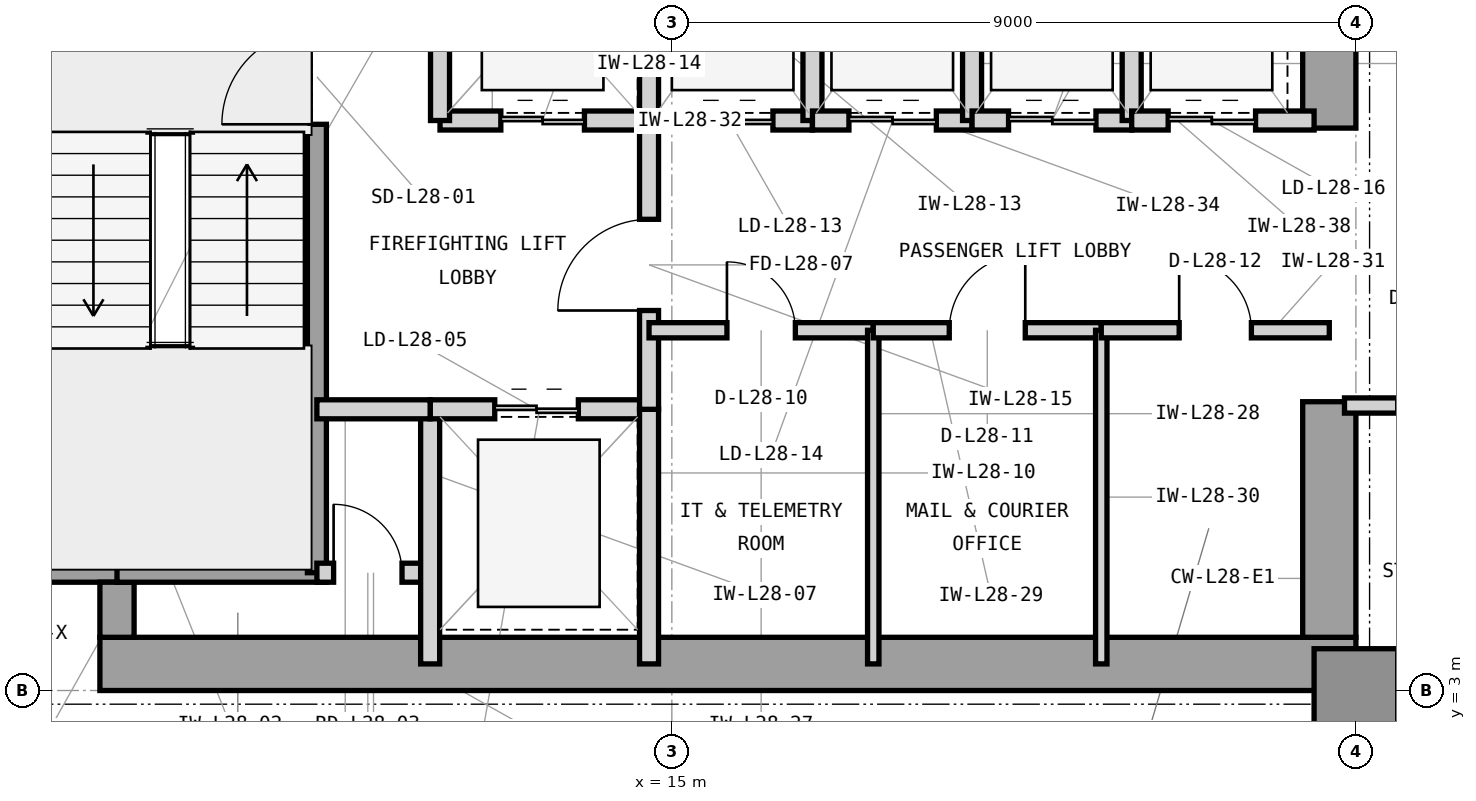
"""IFC4 building model, lengths in metres.
Left out: names, types, materials, properties, quantities, classifications, styles, units other than length and angle.
Written with IfcOpenShell. Run it as: python <this file> out.ifc"""

import sys

from ifc_helpers import new_model, si_unit, direction, frame, frame_2d, origin, origin_2d, place, context, subcontext, project, spatial, rectangle, extrude, element, fill, save


model = new_model("IFC4")
c1 = context("Model", 3, precision=1e-05, world=origin(), true_north=direction((0.0, 1.0)))
c2 = subcontext(c1, "Body", "Model", "MODEL_VIEW")
j1 = project(units=[si_unit("LENGTHUNIT", "METRE"), si_unit("PLANEANGLEUNIT", "RADIAN")], contexts=[c1])
p1 = place(None, origin())
s1 = spatial("IfcSite", under=j1, at=p1, CompositionType="ELEMENT")
p2 = place(p1, origin())
s2 = spatial("IfcBuilding", under=s1, at=p2, CompositionType="ELEMENT")
p3 = place(p2, frame((0.0, 0.0, 120.6)))
s3 = spatial("IfcBuildingStorey", under=s2, at=p3, CompositionType="ELEMENT", Elevation=120.6)
p4 = place(p3, frame((7.475, 3.35, 0.0), z_axis=(0.0, 0.0, 1.0), x_axis=(1.0, 0.0, 0.0)))
e1 = element("IfcWall", 1, at=p4, inside=s3, PredefinedType="SHEAR", context=c2, shape_type="SweptSolid", body=[
    extrude(rectangle(XDim=16.525, YDim=0.7, at=frame_2d((8.262, 0.0))), origin(), (0.0, 0.0, 1.0), 3.9),
])
p5 = place(p3, frame((23.65, 3.7, 0.0), z_axis=(0.0, 0.0, 1.0), x_axis=(0.0, 1.0, 0.0)))
e2 = element("IfcWall", 2, at=p5, inside=s3, PredefinedType="SHEAR", context=c2, shape_type="SweptSolid", body=[
    extrude(rectangle(XDim=3.1, YDim=0.7, at=frame_2d((1.55, 0.0))), origin(), (0.0, 0.0, 1.0), 3.9),
])
p6 = place(p3, frame((23.65, 10.4, 0.0), z_axis=(0.0, 0.0, 1.0), x_axis=(0.0, 1.0, 0.0)))
e3 = element("IfcWall", 3, at=p6, inside=s3, PredefinedType="SHEAR", context=c2, shape_type="SweptSolid", body=[
    extrude(rectangle(XDim=3.2, YDim=0.7, at=frame_2d((1.6, 0.0))), origin(), (0.0, 0.0, 1.0), 3.9),
])
p7 = place(p3, frame((6.7, 4.65, 0.0), z_axis=(0.0, 0.0, 1.0), x_axis=(1.0, 0.0, 0.0)))
e4 = element("IfcWall", 4, at=p7, inside=s3, PredefinedType="SHEAR", context=c2, shape_type="SweptSolid", body=[
    extrude(rectangle(XDim=1.225, YDim=0.45, at=frame_2d((0.613, 0.0))), origin(), (0.0, 0.0, 1.0), 3.9),
])
p8 = place(p3, frame((7.7, 3.7, 0.0), z_axis=(0.0, 0.0, 1.0), x_axis=(0.0, 1.0, 0.0)))
e5 = element("IfcWall", 5, at=p8, inside=s3, PredefinedType="SHEAR", context=c2, shape_type="SweptSolid", body=[
    extrude(rectangle(XDim=0.725, YDim=0.45, at=frame_2d((0.363, 0.0))), origin(), (0.0, 0.0, 1.0), 3.9),
])
p9 = place(p3, frame((24.0, 3.0, 0.0), z_axis=(0.0, 0.0, 1.0), x_axis=(1.0, 0.0, 0.0)))
e6 = element("IfcColumn", 6, at=p9, inside=s3, PredefinedType="COLUMN", context=c2, shape_type="SweptSolid", body=[
    extrude(rectangle(XDim=1.1, YDim=1.1, at=origin_2d()), origin(), (0.0, 0.0, 1.0), 3.9),
])
p10 = place(p3, frame((23.9, 3.19, 0.0), z_axis=(0.0, 0.0, 1.0), x_axis=(1.0, 0.0, 0.0)))
e7 = element("IfcWall", 7, at=p10, inside=s3, PredefinedType="STANDARD", context=c2, shape_type="SweptSolid", body=[
    extrude(rectangle(XDim=18.1, YDim=0.38, at=frame_2d((9.05, 0.0))), origin(), (0.0, 0.0, 1.0), 3.7),
])
p11 = place(p10, frame((5.538, 0.0, 0.85)))
e8 = element("IfcOpeningElement", 8, at=p11, cuts=e7, PredefinedType="OPENING", context=c2, shape_type="SweptSolid", body=[
    extrude(rectangle(XDim=2.5, YDim=2.25, at=frame_2d((1.25, 1.125))), frame((0.0, 0.2, 0.0), z_axis=(0.0, -1.0, 0.0), x_axis=(1.0, 0.0, 0.0)), (0.0, 0.0, 1.0), 0.4),
])
p12 = place(p10, frame((14.938, 0.0, 0.85)))
e9 = element("IfcOpeningElement", 9, at=p12, cuts=e7, PredefinedType="OPENING", context=c2, shape_type="SweptSolid", body=[
    extrude(rectangle(XDim=1.8, YDim=2.25, at=frame_2d((0.9, 1.125))), frame((0.0, 0.2, 0.0), z_axis=(0.0, -1.0, 0.0), x_axis=(1.0, 0.0, 0.0)), (0.0, 0.0, 1.0), 0.4),
])
p13 = place(p10, frame((1.1, 0.0, 0.85)))
e10 = element("IfcOpeningElement", 10, at=p13, cuts=e7, PredefinedType="OPENING", context=c2, shape_type="SweptSolid", body=[
    extrude(rectangle(XDim=1.2, YDim=2.25, at=frame_2d((0.6, 1.125))), frame((0.0, 0.2, 0.0), z_axis=(0.0, -1.0, 0.0), x_axis=(1.0, 0.0, 0.0)), (0.0, 0.0, 1.0), 0.4),
])
p14 = place(p3, frame((7.7, 4.55, 0.0), z_axis=(0.0, 0.0, 1.0), x_axis=(1.0, 0.0, 0.0)))
e11 = element("IfcWall", 11, at=p14, inside=s3, PredefinedType="SHEAR", context=c2, shape_type="SweptSolid", body=[
    extrude(rectangle(XDim=2.755, YDim=0.25, at=frame_2d((1.377, 0.0))), origin(), (0.0, 0.0, 1.0), 3.9),
])
p15 = place(p3, frame((10.33, 4.55, 0.0), z_axis=(0.0, 0.0, 1.0), x_axis=(0.0, 1.0, 0.0)))
e12 = element("IfcWall", 12, at=p15, inside=s3, PredefinedType="SHEAR", context=c2, shape_type="SweptSolid", body=[
    extrude(rectangle(XDim=7.45, YDim=0.25, at=frame_2d((3.725, 0.0))), origin(), (0.0, 0.0, 1.0), 3.9),
])
p16 = place(p15, frame((5.9, 0.0, 0.0)))
e13 = element("IfcOpeningElement", 13, at=p16, cuts=e12, PredefinedType="OPENING", context=c2, shape_type="SweptSolid", body=[
    extrude(rectangle(XDim=1.25, YDim=2.2, at=frame_2d((0.625, 1.1))), frame((0.0, 0.135, 0.0), z_axis=(0.0, -1.0, 0.0), x_axis=(1.0, 0.0, 0.0)), (0.0, 0.0, 1.0), 0.27),
])
p17 = place(p3, frame((10.33, 4.55, 0.0), z_axis=(0.0, 0.0, 1.0), x_axis=(1.0, 0.0, 0.0)))
e14 = element("IfcWall", 14, at=p17, inside=s3, PredefinedType="PARTITIONING", context=c2, shape_type="SweptSolid", body=[
    extrude(rectangle(XDim=1.49, YDim=0.25, at=frame_2d((0.745, 0.0))), origin(), (0.0, 0.0, 1.0), 3.69),
])
p18 = place(p17, frame((0.22, 0.0, 0.0)))
e15 = element("IfcOpeningElement", 15, at=p18, cuts=e14, PredefinedType="OPENING", context=c2, shape_type="SweptSolid", body=[
    extrude(rectangle(XDim=0.9, YDim=2.1, at=frame_2d((0.45, 1.05))), frame((0.0, 0.135, 0.0), z_axis=(0.0, -1.0, 0.0), x_axis=(1.0, 0.0, 0.0)), (0.0, 0.0, 1.0), 0.27),
])
p19 = place(p3, frame((11.82, 3.35, 0.0), z_axis=(0.0, 0.0, 1.0), x_axis=(0.0, 1.0, 0.0)))
e16 = element("IfcWall", 16, at=p19, inside=s3, PredefinedType="PARTITIONING", context=c2, shape_type="SweptSolid", body=[
    extrude(rectangle(XDim=3.35, YDim=0.25, at=frame_2d((1.675, 0.0))), origin(), (0.0, 0.0, 1.0), 3.69),
])
p20 = place(p3, frame((11.82, 6.7, 0.0), z_axis=(0.0, 0.0, 1.0), x_axis=(1.0, 0.0, 0.0)))
e17 = element("IfcWall", 17, at=p20, inside=s3, PredefinedType="PARTITIONING", context=c2, shape_type="SweptSolid", body=[
    extrude(rectangle(XDim=2.88, YDim=0.25, at=frame_2d((1.44, 0.0))), origin(), (0.0, 0.0, 1.0), 3.227),
])
p21 = place(p20, frame((0.85, 0.0, 0.0)))
e18 = element("IfcOpeningElement", 18, at=p21, cuts=e17, PredefinedType="OPENING", context=c2, shape_type="SweptSolid", body=[
    extrude(rectangle(XDim=1.1, YDim=2.25, at=frame_2d((0.55, 1.125))), frame((0.0, 0.135, 0.0), z_axis=(0.0, -1.0, 0.0), x_axis=(1.0, 0.0, 0.0)), (0.0, 0.0, 1.0), 0.27),
])
p22 = place(p3, frame((14.7, 3.35, 0.0), z_axis=(0.0, 0.0, 1.0), x_axis=(0.0, 1.0, 0.0)))
e19 = element("IfcWall", 19, at=p22, inside=s3, PredefinedType="PARTITIONING", context=c2, shape_type="SweptSolid", body=[
    extrude(rectangle(XDim=3.35, YDim=0.25, at=frame_2d((1.675, 0.0))), origin(), (0.0, 0.0, 1.0), 3.69),
])
p23 = place(p3, frame((11.95, 10.5, 0.0), z_axis=(0.0, 0.0, 1.0), x_axis=(1.0, 0.0, 0.0)))
e20 = element("IfcWall", 20, at=p23, inside=s3, PredefinedType="PARTITIONING", context=c2, shape_type="SweptSolid", body=[
    extrude(rectangle(XDim=2.75, YDim=0.25, at=frame_2d((1.375, 0.0))), origin(), (0.0, 0.0, 1.0), 3.227),
])
p24 = place(p23, frame((0.8, 0.0, 0.0)))
e21 = element("IfcOpeningElement", 21, at=p24, cuts=e20, PredefinedType="OPENING", context=c2, shape_type="SweptSolid", body=[
    extrude(rectangle(XDim=1.1, YDim=2.25, at=frame_2d((0.55, 1.125))), frame((0.0, 0.135, 0.0), z_axis=(0.0, -1.0, 0.0), x_axis=(1.0, 0.0, 0.0)), (0.0, 0.0, 1.0), 0.27),
])
for number, where, z_axis, x_axis in (
    (22, (11.95, 10.5, 0.0), (0.0, 0.0, 1.0), (0.0, 1.0, 0.0)),
    (23, (14.7, 10.5, 0.0), (0.0, 0.0, 1.0), (0.0, 1.0, 0.0)),
):
    element("IfcWall", number, at=place(p3, frame(where, z_axis=z_axis, x_axis=x_axis)), inside=s3, PredefinedType="PARTITIONING", context=c2, shape_type="SweptSolid", body=[
        extrude(rectangle(XDim=3.0, YDim=0.25, at=frame_2d((1.5, 0.0))), origin(), (0.0, 0.0, 1.0), 3.69),
    ])
p25 = place(p3, frame((14.7, 6.7, 0.0), z_axis=(0.0, 0.0, 1.0), x_axis=(0.0, 1.0, 0.0)))
e24 = element("IfcWall", 24, at=p25, inside=s3, PredefinedType="PARTITIONING", context=c2, shape_type="SweptSolid", body=[
    extrude(rectangle(XDim=3.8, YDim=0.25, at=frame_2d((1.9, 0.0))), origin(), (0.0, 0.0, 1.0), 3.69),
])
p26 = place(p25, frame((1.3, 0.0, 0.0)))
e25 = element("IfcOpeningElement", 25, at=p26, cuts=e24, PredefinedType="OPENING", context=c2, shape_type="SweptSolid", body=[
    extrude(rectangle(XDim=1.2, YDim=2.2, at=frame_2d((0.6, 1.1))), frame((0.0, 0.135, 0.0), z_axis=(0.0, -1.0, 0.0), x_axis=(1.0, 0.0, 0.0)), (0.0, 0.0, 1.0), 0.27),
])
p27 = place(p3, frame((10.33, 6.7, 0.0), z_axis=(0.0, 0.0, 1.0), x_axis=(1.0, 0.0, 0.0)))
e26 = element("IfcWall", 26, at=p27, inside=s3, PredefinedType="PARTITIONING", context=c2, shape_type="SweptSolid", body=[
    extrude(rectangle(XDim=1.49, YDim=0.25, at=frame_2d((0.745, 0.0))), origin(), (0.0, 0.0, 1.0), 3.227),
])
p28 = place(p3, frame((14.7, 7.74, 0.0), z_axis=(0.0, 0.0, 1.0), x_axis=(1.0, 0.0, 0.0)))
e27 = element("IfcWall", 27, at=p28, inside=s3, PredefinedType="PARTITIONING", context=c2, shape_type="SweptSolid", body=[
    extrude(rectangle(XDim=2.95, YDim=0.2, at=frame_2d((1.475, 0.0))), origin(), (0.0, 0.0, 1.0), 3.69),
])
p29 = place(p28, frame((1.025, 0.0, 0.0)))
e28 = element("IfcOpeningElement", 28, at=p29, cuts=e27, PredefinedType="OPENING", context=c2, shape_type="SweptSolid", body=[
    extrude(rectangle(XDim=0.9, YDim=2.1, at=frame_2d((0.45, 1.05))), frame((0.0, 0.11, 0.0), z_axis=(0.0, -1.0, 0.0), x_axis=(1.0, 0.0, 0.0)), (0.0, 0.0, 1.0), 0.22),
])
p30 = place(p3, frame((17.65, 3.35, 0.0), z_axis=(0.0, 0.0, 1.0), x_axis=(0.0, 1.0, 0.0)))
e29 = element("IfcWall", 29, at=p30, inside=s3, PredefinedType="PARTITIONING", context=c2, shape_type="SweptSolid", body=[
    extrude(rectangle(XDim=4.39, YDim=0.15, at=frame_2d((2.195, 0.0))), origin(), (0.0, 0.0, 1.0), 3.69),
])
p31 = place(p3, frame((17.65, 7.74, 0.0), z_axis=(0.0, 0.0, 1.0), x_axis=(1.0, 0.0, 0.0)))
e30 = element("IfcWall", 30, at=p31, inside=s3, PredefinedType="PARTITIONING", context=c2, shape_type="SweptSolid", body=[
    extrude(rectangle(XDim=3.0, YDim=0.2, at=frame_2d((1.5, 0.0))), origin(), (0.0, 0.0, 1.0), 3.69),
])
p32 = place(p31, frame((1.0, 0.0, 0.0)))
e31 = element("IfcOpeningElement", 31, at=p32, cuts=e30, PredefinedType="OPENING", context=c2, shape_type="SweptSolid", body=[
    extrude(rectangle(XDim=1.0, YDim=2.15, at=frame_2d((0.5, 1.075))), frame((0.0, 0.11, 0.0), z_axis=(0.0, -1.0, 0.0), x_axis=(1.0, 0.0, 0.0)), (0.0, 0.0, 1.0), 0.22),
])
p33 = place(p3, frame((20.65, 3.35, 0.0), z_axis=(0.0, 0.0, 1.0), x_axis=(0.0, 1.0, 0.0)))
e32 = element("IfcWall", 32, at=p33, inside=s3, PredefinedType="PARTITIONING", context=c2, shape_type="SweptSolid", body=[
    extrude(rectangle(XDim=4.39, YDim=0.15, at=frame_2d((2.195, 0.0))), origin(), (0.0, 0.0, 1.0), 3.69),
])
p34 = place(p3, frame((20.65, 7.74, 0.0), z_axis=(0.0, 0.0, 1.0), x_axis=(1.0, 0.0, 0.0)))
e33 = element("IfcWall", 33, at=p34, inside=s3, PredefinedType="PARTITIONING", context=c2, shape_type="SweptSolid", body=[
    extrude(rectangle(XDim=3.0, YDim=0.2, at=frame_2d((1.5, 0.0))), origin(), (0.0, 0.0, 1.0), 3.69),
])
p35 = place(p34, frame((1.025, 0.0, 0.0)))
e34 = element("IfcOpeningElement", 34, at=p35, cuts=e33, PredefinedType="OPENING", context=c2, shape_type="SweptSolid", body=[
    extrude(rectangle(XDim=0.95, YDim=2.1, at=frame_2d((0.475, 1.05))), frame((0.0, 0.11, 0.0), z_axis=(0.0, -1.0, 0.0), x_axis=(1.0, 0.0, 0.0)), (0.0, 0.0, 1.0), 0.22),
])
p36 = place(p3, frame((14.7, 10.5, 0.0), z_axis=(0.0, 0.0, 1.0), x_axis=(1.0, 0.0, 0.0)))
e35 = element("IfcWall", 35, at=p36, inside=s3, PredefinedType="PARTITIONING", context=c2, shape_type="SweptSolid", body=[
    extrude(rectangle(XDim=2.15, YDim=0.25, at=frame_2d((1.075, 0.0))), origin(), (0.0, 0.0, 1.0), 3.227),
])
p37 = place(p36, frame((0.48, 0.0, 0.0)))
e36 = element("IfcOpeningElement", 36, at=p37, cuts=e35, PredefinedType="OPENING", context=c2, shape_type="SweptSolid", body=[
    extrude(rectangle(XDim=1.15, YDim=2.25, at=frame_2d((0.575, 1.125))), frame((0.0, 0.135, 0.0), z_axis=(0.0, -1.0, 0.0), x_axis=(1.0, 0.0, 0.0)), (0.0, 0.0, 1.0), 0.27),
])
p38 = place(p3, frame((16.85, 10.5, 0.0), z_axis=(0.0, 0.0, 1.0), x_axis=(0.0, 1.0, 0.0)))
e37 = element("IfcWall", 37, at=p38, inside=s3, PredefinedType="PARTITIONING", context=c2, shape_type="SweptSolid", body=[
    extrude(rectangle(XDim=3.0, YDim=0.25, at=frame_2d((1.5, 0.0))), origin(), (0.0, 0.0, 1.0), 3.69),
])
p39 = place(p3, frame((16.85, 10.5, 0.0), z_axis=(0.0, 0.0, 1.0), x_axis=(1.0, 0.0, 0.0)))
e38 = element("IfcWall", 38, at=p39, inside=s3, PredefinedType="PARTITIONING", context=c2, shape_type="SweptSolid", body=[
    extrude(rectangle(XDim=2.1, YDim=0.25, at=frame_2d((1.05, 0.0))), origin(), (0.0, 0.0, 1.0), 3.227),
])
p40 = place(p39, frame((0.48, 0.0, 0.0)))
e39 = element("IfcOpeningElement", 39, at=p40, cuts=e38, PredefinedType="OPENING", context=c2, shape_type="SweptSolid", body=[
    extrude(rectangle(XDim=1.15, YDim=2.25, at=frame_2d((0.575, 1.125))), frame((0.0, 0.135, 0.0), z_axis=(0.0, -1.0, 0.0), x_axis=(1.0, 0.0, 0.0)), (0.0, 0.0, 1.0), 0.27),
])
p41 = place(p3, frame((18.95, 10.5, 0.0), z_axis=(0.0, 0.0, 1.0), x_axis=(0.0, 1.0, 0.0)))
e40 = element("IfcWall", 40, at=p41, inside=s3, PredefinedType="PARTITIONING", context=c2, shape_type="SweptSolid", body=[
    extrude(rectangle(XDim=3.0, YDim=0.25, at=frame_2d((1.5, 0.0))), origin(), (0.0, 0.0, 1.0), 3.69),
])
p42 = place(p3, frame((18.95, 10.5, 0.0), z_axis=(0.0, 0.0, 1.0), x_axis=(1.0, 0.0, 0.0)))
e41 = element("IfcWall", 41, at=p42, inside=s3, PredefinedType="PARTITIONING", context=c2, shape_type="SweptSolid", body=[
    extrude(rectangle(XDim=2.1, YDim=0.25, at=frame_2d((1.05, 0.0))), origin(), (0.0, 0.0, 1.0), 3.227),
])
p43 = place(p42, frame((0.48, 0.0, 0.0)))
e42 = element("IfcOpeningElement", 42, at=p43, cuts=e41, PredefinedType="OPENING", context=c2, shape_type="SweptSolid", body=[
    extrude(rectangle(XDim=1.15, YDim=2.25, at=frame_2d((0.575, 1.125))), frame((0.0, 0.135, 0.0), z_axis=(0.0, -1.0, 0.0), x_axis=(1.0, 0.0, 0.0)), (0.0, 0.0, 1.0), 0.27),
])
p44 = place(p3, frame((21.05, 10.5, 0.0), z_axis=(0.0, 0.0, 1.0), x_axis=(0.0, 1.0, 0.0)))
e43 = element("IfcWall", 43, at=p44, inside=s3, PredefinedType="PARTITIONING", context=c2, shape_type="SweptSolid", body=[
    extrude(rectangle(XDim=3.0, YDim=0.25, at=frame_2d((1.5, 0.0))), origin(), (0.0, 0.0, 1.0), 3.69),
])
p45 = place(p3, frame((21.05, 10.5, 0.0), z_axis=(0.0, 0.0, 1.0), x_axis=(1.0, 0.0, 0.0)))
e44 = element("IfcWall", 44, at=p45, inside=s3, PredefinedType="PARTITIONING", context=c2, shape_type="SweptSolid", body=[
    extrude(rectangle(XDim=2.4, YDim=0.25, at=frame_2d((1.2, 0.0))), origin(), (0.0, 0.0, 1.0), 3.227),
])
p46 = place(p45, frame((0.48, 0.0, 0.0)))
e45 = element("IfcOpeningElement", 45, at=p46, cuts=e44, PredefinedType="OPENING", context=c2, shape_type="SweptSolid", body=[
    extrude(rectangle(XDim=1.15, YDim=2.25, at=frame_2d((0.575, 1.125))), frame((0.0, 0.135, 0.0), z_axis=(0.0, -1.0, 0.0), x_axis=(1.0, 0.0, 0.0)), (0.0, 0.0, 1.0), 0.27),
])
p47 = place(p3, frame((23.85, 6.75, 0.0), z_axis=(0.0, 0.0, 1.0), x_axis=(1.0, 0.0, 0.0)))
e46 = element("IfcWall", 46, at=p47, inside=s3, PredefinedType="PARTITIONING", context=c2, shape_type="SweptSolid", body=[
    extrude(rectangle(XDim=2.85, YDim=0.2, at=frame_2d((1.425, 0.0))), origin(), (0.0, 0.0, 1.0), 3.69),
])
p48 = place(p47, frame((0.7, 0.0, 0.0)))
e47 = element("IfcOpeningElement", 47, at=p48, cuts=e46, PredefinedType="OPENING", context=c2, shape_type="SweptSolid", body=[
    extrude(rectangle(XDim=1.0, YDim=2.15, at=frame_2d((0.5, 1.075))), frame((0.0, 0.11, 0.0), z_axis=(0.0, -1.0, 0.0), x_axis=(1.0, 0.0, 0.0)), (0.0, 0.0, 1.0), 0.22),
])
p49 = place(p16, origin())
e48 = element("IfcDoor", 48, at=p49, inside=s3, OperationType="SINGLE_SWING_LEFT", PredefinedType="DOOR", context=c2, shape_type="SweptSolid", body=[
    extrude(rectangle(XDim=1.25, YDim=2.2, at=frame_2d((0.625, 1.1))), frame((0.0, 0.025, 0.0), z_axis=(0.0, -1.0, 0.0), x_axis=(1.0, 0.0, 0.0)), (0.0, 0.0, 1.0), 0.05),
])
fill(e13, e48)
p50 = place(p18, origin())
e49 = element("IfcDoor", 49, at=p50, inside=s3, OperationType="SINGLE_SWING_LEFT", PredefinedType="TRAPDOOR", context=c2, shape_type="SweptSolid", body=[
    extrude(rectangle(XDim=0.9, YDim=2.1, at=frame_2d((0.45, 1.05))), frame((0.0, 0.025, 0.0), z_axis=(0.0, -1.0, 0.0), x_axis=(1.0, 0.0, 0.0)), (0.0, 0.0, 1.0), 0.05),
])
fill(e15, e49)
p51 = place(p21, origin())
e50 = element("IfcDoor", 50, at=p51, inside=s3, OperationType="DOUBLE_DOOR_SLIDING", PredefinedType="DOOR", context=c2, shape_type="SweptSolid", body=[
    extrude(rectangle(XDim=1.1, YDim=2.25, at=frame_2d((0.55, 1.125))), frame((0.0, 0.025, 0.0), z_axis=(0.0, -1.0, 0.0), x_axis=(1.0, 0.0, 0.0)), (0.0, 0.0, 1.0), 0.05),
])
fill(e18, e50)
p52 = place(p24, origin())
e51 = element("IfcDoor", 51, at=p52, inside=s3, OperationType="DOUBLE_DOOR_SLIDING", PredefinedType="DOOR", context=c2, shape_type="SweptSolid", body=[
    extrude(rectangle(XDim=1.1, YDim=2.25, at=frame_2d((0.55, 1.125))), frame((0.0, 0.025, 0.0), z_axis=(0.0, -1.0, 0.0), x_axis=(1.0, 0.0, 0.0)), (0.0, 0.0, 1.0), 0.05),
])
fill(e21, e51)
p53 = place(p26, origin())
e52 = element("IfcDoor", 52, at=p53, inside=s3, OperationType="SINGLE_SWING_LEFT", PredefinedType="DOOR", context=c2, shape_type="SweptSolid", body=[
    extrude(rectangle(XDim=1.2, YDim=2.2, at=frame_2d((0.6, 1.1))), frame((0.0, 0.025, 0.0), z_axis=(0.0, -1.0, 0.0), x_axis=(1.0, 0.0, 0.0)), (0.0, 0.0, 1.0), 0.05),
])
fill(e25, e52)
p54 = place(p29, origin())
e53 = element("IfcDoor", 53, at=p54, inside=s3, OperationType="SINGLE_SWING_LEFT", PredefinedType="TRAPDOOR", context=c2, shape_type="SweptSolid", body=[
    extrude(rectangle(XDim=0.9, YDim=2.1, at=frame_2d((0.45, 1.05))), frame((0.0, 0.025, 0.0), z_axis=(0.0, -1.0, 0.0), x_axis=(1.0, 0.0, 0.0)), (0.0, 0.0, 1.0), 0.05),
])
fill(e28, e53)
p55 = place(p32, origin())
e54 = element("IfcDoor", 54, at=p55, inside=s3, OperationType="SINGLE_SWING_RIGHT", PredefinedType="DOOR", context=c2, shape_type="SweptSolid", body=[
    extrude(rectangle(XDim=1.0, YDim=2.15, at=frame_2d((0.5, 1.075))), frame((0.0, 0.025, 0.0), z_axis=(0.0, -1.0, 0.0), x_axis=(1.0, 0.0, 0.0)), (0.0, 0.0, 1.0), 0.05),
])
fill(e31, e54)
p56 = place(p35, origin())
e55 = element("IfcDoor", 55, at=p56, inside=s3, OperationType="SINGLE_SWING_LEFT", PredefinedType="DOOR", context=c2, shape_type="SweptSolid", body=[
    extrude(rectangle(XDim=0.95, YDim=2.1, at=frame_2d((0.475, 1.05))), frame((0.0, 0.025, 0.0), z_axis=(0.0, -1.0, 0.0), x_axis=(1.0, 0.0, 0.0)), (0.0, 0.0, 1.0), 0.05),
])
fill(e34, e55)
p57 = place(p37, origin())
e56 = element("IfcDoor", 56, at=p57, inside=s3, OperationType="DOUBLE_DOOR_SLIDING", PredefinedType="DOOR", context=c2, shape_type="SweptSolid", body=[
    extrude(rectangle(XDim=1.15, YDim=2.25, at=frame_2d((0.575, 1.125))), frame((0.0, 0.025, 0.0), z_axis=(0.0, -1.0, 0.0), x_axis=(1.0, 0.0, 0.0)), (0.0, 0.0, 1.0), 0.05),
])
fill(e36, e56)
p58 = place(p40, origin())
e57 = element("IfcDoor", 57, at=p58, inside=s3, OperationType="DOUBLE_DOOR_SLIDING", PredefinedType="DOOR", context=c2, shape_type="SweptSolid", body=[
    extrude(rectangle(XDim=1.15, YDim=2.25, at=frame_2d((0.575, 1.125))), frame((0.0, 0.025, 0.0), z_axis=(0.0, -1.0, 0.0), x_axis=(1.0, 0.0, 0.0)), (0.0, 0.0, 1.0), 0.05),
])
fill(e39, e57)
p59 = place(p43, origin())
e58 = element("IfcDoor", 58, at=p59, inside=s3, OperationType="DOUBLE_DOOR_SLIDING", PredefinedType="DOOR", context=c2, shape_type="SweptSolid", body=[
    extrude(rectangle(XDim=1.15, YDim=2.25, at=frame_2d((0.575, 1.125))), frame((0.0, 0.025, 0.0), z_axis=(0.0, -1.0, 0.0), x_axis=(1.0, 0.0, 0.0)), (0.0, 0.0, 1.0), 0.05),
])
fill(e42, e58)
p60 = place(p46, origin())
e59 = element("IfcDoor", 59, at=p60, inside=s3, OperationType="DOUBLE_DOOR_SLIDING", PredefinedType="DOOR", context=c2, shape_type="SweptSolid", body=[
    extrude(rectangle(XDim=1.15, YDim=2.25, at=frame_2d((0.575, 1.125))), frame((0.0, 0.025, 0.0), z_axis=(0.0, -1.0, 0.0), x_axis=(1.0, 0.0, 0.0)), (0.0, 0.0, 1.0), 0.05),
])
fill(e45, e59)
save(model, sys.argv[1])
